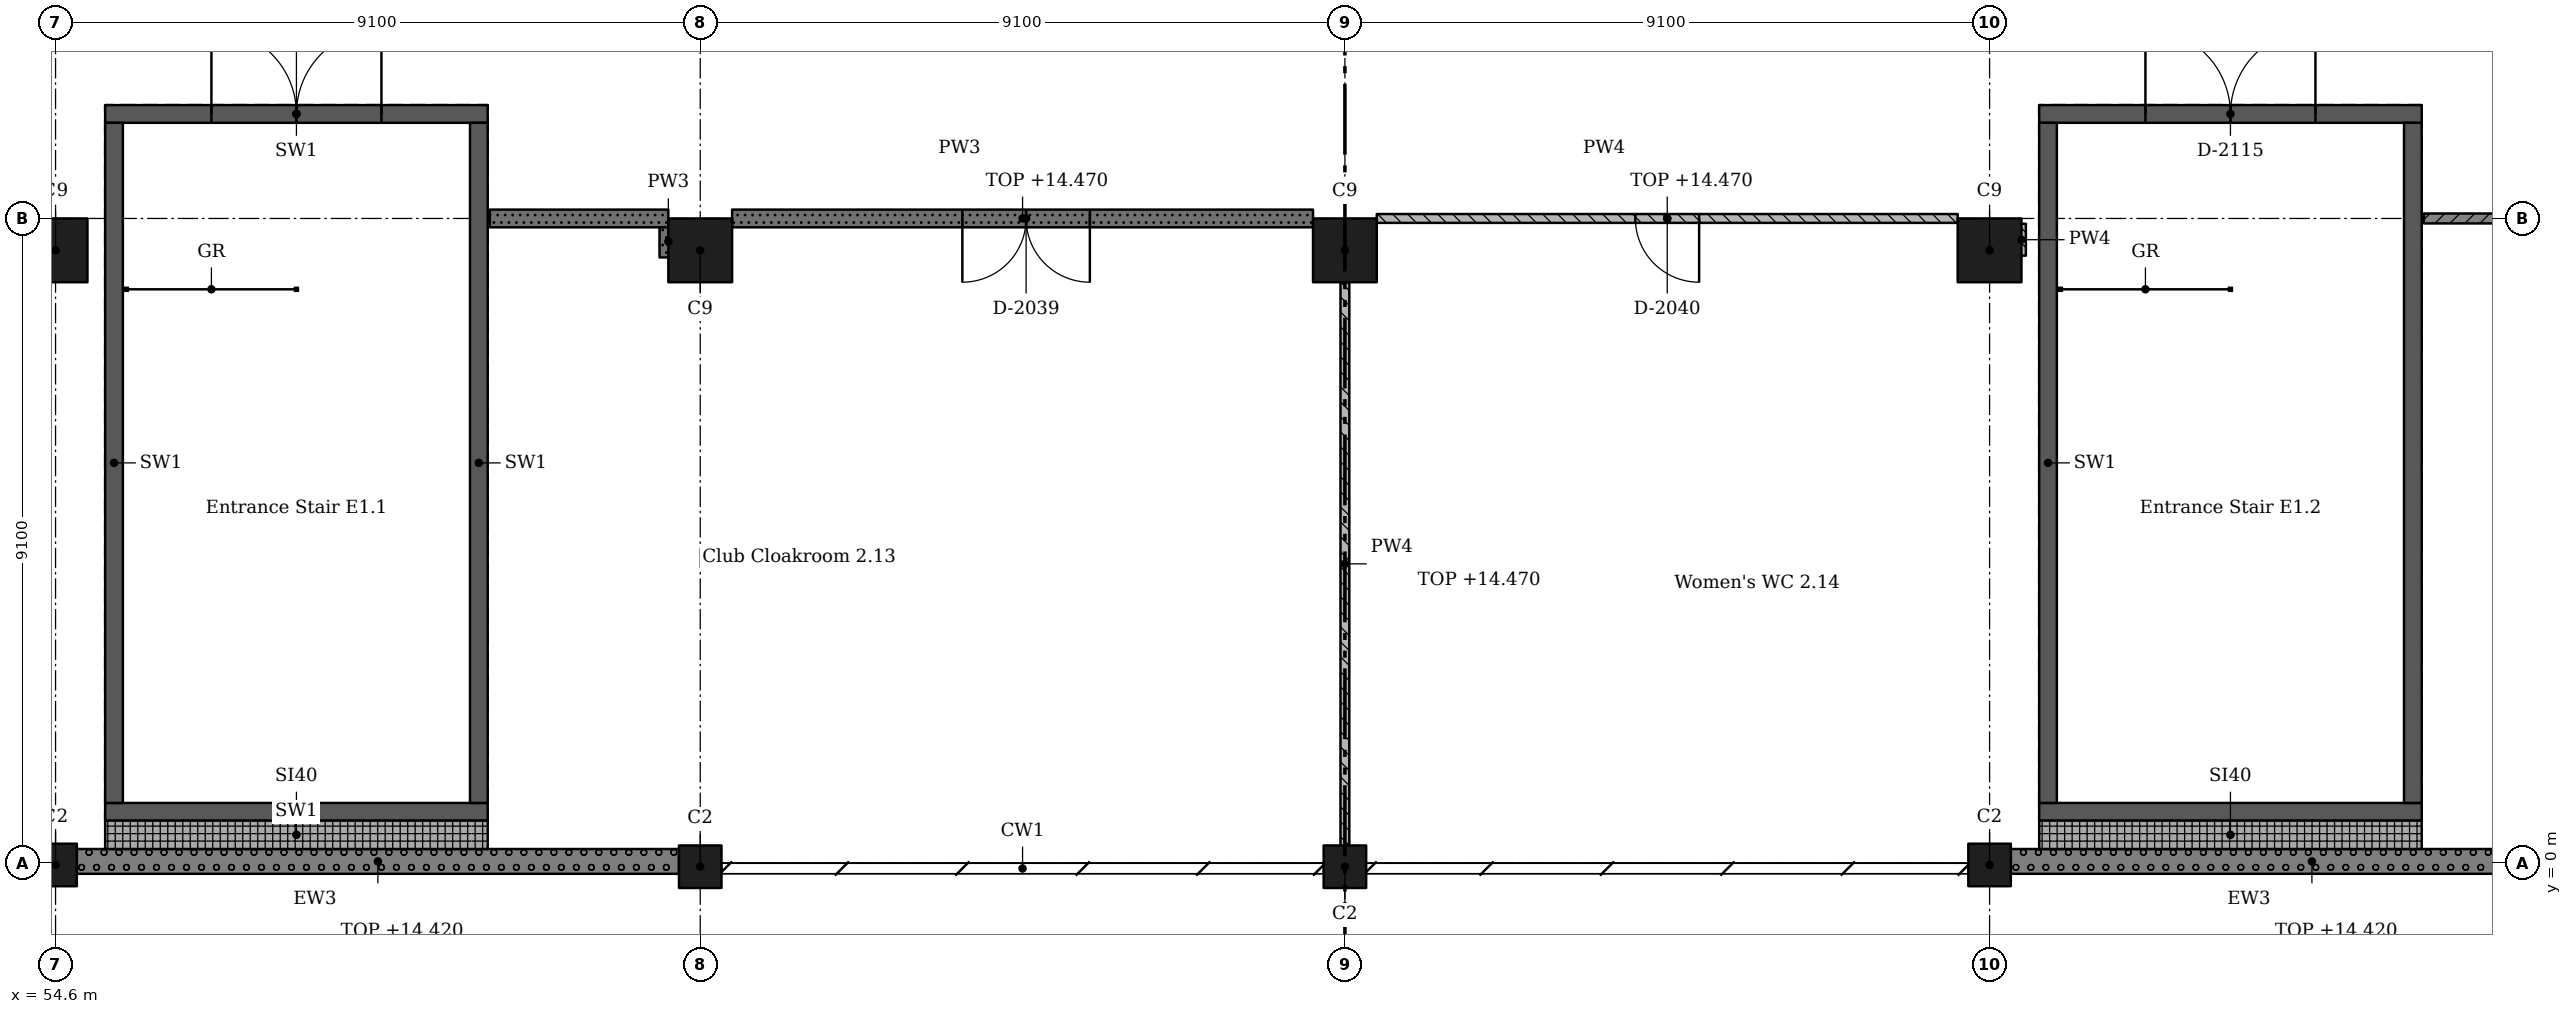
"""IFC4 building model, lengths in metres.
Left out: names, types, materials, properties, quantities, classifications, styles, units other than length and angle.
Written with IfcOpenShell. Run it as: python <this file> out.ifc"""

import sys

from ifc_helpers import new_model, si_unit, direction, frame, frame_2d, origin, origin_2d, place, context, subcontext, project, spatial, rectangle, extrude, element, fill, save


model = new_model("IFC4")
c1 = context("Model", 3, precision=1e-05, world=origin(), true_north=direction((0.0, 1.0)))
c2 = subcontext(c1, "Body", "Model", "MODEL_VIEW")
j1 = project(units=[si_unit("LENGTHUNIT", "METRE"), si_unit("PLANEANGLEUNIT", "RADIAN")], contexts=[c1])
p1 = place(None, origin())
s1 = spatial("IfcSite", under=j1, at=p1, CompositionType="ELEMENT")
p2 = place(p1, origin())
s2 = spatial("IfcBuilding", under=s1, at=p2, CompositionType="ELEMENT")
p3 = place(p2, frame((0.0, 0.0, 10.92)))
s3 = spatial("IfcBuildingStorey", under=s2, at=p3, CompositionType="ELEMENT", Elevation=10.92)
p4 = place(p3, frame((54.6, -0.025, 0.0), z_axis=(0.0, 0.0, 1.0), x_axis=(1.0, 0.0, 0.0)))
e1 = element("IfcColumn", 1, at=p4, inside=s3, PredefinedType="COLUMN", context=c2, shape_type="SweptSolid", body=[
    extrude(rectangle(XDim=0.6, YDim=0.6, at=origin_2d()), origin(), (0.0, 0.0, 1.0), 4.55),
])
p5 = place(p3, frame((54.6, 8.65, 0.0), z_axis=(0.0, 0.0, 1.0), x_axis=(1.0, 0.0, 0.0)))
e2 = element("IfcColumn", 2, at=p5, inside=s3, PredefinedType="COLUMN", context=c2, shape_type="SweptSolid", body=[
    extrude(rectangle(XDim=0.9, YDim=0.9, at=origin_2d()), origin(), (0.0, 0.0, 1.0), 4.55),
])
p6 = place(p3, frame((63.7, -0.05, 0.0), z_axis=(0.0, 0.0, 1.0), x_axis=(1.0, 0.0, 0.0)))
e3 = element("IfcColumn", 3, at=p6, inside=s3, PredefinedType="COLUMN", context=c2, shape_type="SweptSolid", body=[
    extrude(rectangle(XDim=0.6, YDim=0.6, at=origin_2d()), origin(), (0.0, 0.0, 1.0), 4.55),
])
p7 = place(p3, frame((63.7, 8.65, 0.0), z_axis=(0.0, 0.0, 1.0), x_axis=(1.0, 0.0, 0.0)))
e4 = element("IfcColumn", 4, at=p7, inside=s3, PredefinedType="COLUMN", context=c2, shape_type="SweptSolid", body=[
    extrude(rectangle(XDim=0.9, YDim=0.9, at=origin_2d()), origin(), (0.0, 0.0, 1.0), 4.55),
])
p8 = place(p3, frame((72.8, -0.05, 0.0), z_axis=(0.0, 0.0, 1.0), x_axis=(1.0, 0.0, 0.0)))
e5 = element("IfcColumn", 5, at=p8, inside=s3, PredefinedType="COLUMN", context=c2, shape_type="SweptSolid", body=[
    extrude(rectangle(XDim=0.6, YDim=0.6, at=origin_2d()), origin(), (0.0, 0.0, 1.0), 4.55),
])
p9 = place(p3, frame((72.8, 8.65, 0.0), z_axis=(0.0, 0.0, 1.0), x_axis=(1.0, 0.0, 0.0)))
e6 = element("IfcColumn", 6, at=p9, inside=s3, PredefinedType="COLUMN", context=c2, shape_type="SweptSolid", body=[
    extrude(rectangle(XDim=0.9, YDim=0.9, at=origin_2d()), origin(), (0.0, 0.0, 1.0), 4.55),
])
p10 = place(p3, frame((81.9, -0.025, 0.0), z_axis=(0.0, 0.0, 1.0), x_axis=(1.0, 0.0, 0.0)))
e7 = element("IfcColumn", 7, at=p10, inside=s3, PredefinedType="COLUMN", context=c2, shape_type="SweptSolid", body=[
    extrude(rectangle(XDim=0.6, YDim=0.6, at=origin_2d()), origin(), (0.0, 0.0, 1.0), 4.55),
])
p11 = place(p3, frame((81.9, 8.65, 0.0), z_axis=(0.0, 0.0, 1.0), x_axis=(1.0, 0.0, 0.0)))
e8 = element("IfcColumn", 8, at=p11, inside=s3, PredefinedType="COLUMN", context=c2, shape_type="SweptSolid", body=[
    extrude(rectangle(XDim=0.9, YDim=0.9, at=origin_2d()), origin(), (0.0, 0.0, 1.0), 4.55),
])
p12 = place(p3, frame((60.7, 0.725, 0.0), z_axis=(0.0, 0.0, 1.0), x_axis=(-1.0, 0.0, 0.0)))
e9 = element("IfcWall", 9, at=p12, inside=s3, PredefinedType="SHEAR", context=c2, shape_type="SweptSolid", body=[
    extrude(rectangle(XDim=5.4, YDim=0.25, at=frame_2d((2.7, 0.0))), origin(), (0.0, 0.0, 1.0), 4.55),
])
p13 = place(p3, frame((60.7, 10.575, 0.0), z_axis=(0.0, 0.0, 1.0), x_axis=(-1.0, 0.0, 0.0)))
e10 = element("IfcWall", 10, at=p13, inside=s3, PredefinedType="SHEAR", context=c2, shape_type="SweptSolid", body=[
    extrude(rectangle(XDim=5.4, YDim=0.25, at=frame_2d((2.7, 0.0))), origin(), (0.0, 0.0, 1.0), 4.55),
])
p14 = place(p13, frame((1.5, 0.0, 0.0)))
e11 = element("IfcOpeningElement", 11, at=p14, cuts=e10, PredefinedType="OPENING", context=c2, shape_type="SweptSolid", body=[
    extrude(rectangle(XDim=2.4, YDim=2.1, at=frame_2d((1.2, 1.05))), frame((0.0, 0.135, 0.0), z_axis=(0.0, -1.0, 0.0), x_axis=(1.0, 0.0, 0.0)), (0.0, 0.0, 1.0), 0.27),
])
for number, where, z_axis, x_axis in (
    (12, (55.425, 10.45, 0.0), (0.0, 0.0, 1.0), (0.0, -1.0, 0.0)),
    (13, (60.575, 10.45, 0.0), (0.0, 0.0, 1.0), (0.0, -1.0, 0.0)),
):
    element("IfcWall", number, at=place(p3, frame(where, z_axis=z_axis, x_axis=x_axis)), inside=s3, PredefinedType="SHEAR", context=c2, shape_type="SweptSolid", body=[
        extrude(rectangle(XDim=9.6, YDim=0.25, at=frame_2d((4.8, 0.0))), origin(), (0.0, 0.0, 1.0), 4.55),
    ])
p15 = place(p3, frame((88.0, 0.725, 0.0), z_axis=(0.0, 0.0, 1.0), x_axis=(-1.0, 0.0, 0.0)))
e14 = element("IfcWall", 14, at=p15, inside=s3, PredefinedType="SHEAR", context=c2, shape_type="SweptSolid", body=[
    extrude(rectangle(XDim=5.4, YDim=0.25, at=frame_2d((2.7, 0.0))), origin(), (0.0, 0.0, 1.0), 4.55),
])
p16 = place(p3, frame((88.0, 10.575, 0.0), z_axis=(0.0, 0.0, 1.0), x_axis=(-1.0, 0.0, 0.0)))
e15 = element("IfcWall", 15, at=p16, inside=s3, PredefinedType="SHEAR", context=c2, shape_type="SweptSolid", body=[
    extrude(rectangle(XDim=5.4, YDim=0.25, at=frame_2d((2.7, 0.0))), origin(), (0.0, 0.0, 1.0), 4.55),
])
p17 = place(p16, frame((1.5, 0.0, 0.0)))
e16 = element("IfcOpeningElement", 16, at=p17, cuts=e15, PredefinedType="OPENING", context=c2, shape_type="SweptSolid", body=[
    extrude(rectangle(XDim=2.4, YDim=2.1, at=frame_2d((1.2, 1.05))), frame((0.0, 0.135, 0.0), z_axis=(0.0, -1.0, 0.0), x_axis=(1.0, 0.0, 0.0)), (0.0, 0.0, 1.0), 0.27),
])
for number, where, z_axis, x_axis in (
    (17, (82.725, 10.45, 0.0), (0.0, 0.0, 1.0), (0.0, -1.0, 0.0)),
    (18, (87.875, 10.45, 0.0), (0.0, 0.0, 1.0), (0.0, -1.0, 0.0)),
):
    element("IfcWall", number, at=place(p3, frame(where, z_axis=z_axis, x_axis=x_axis)), inside=s3, PredefinedType="SHEAR", context=c2, shape_type="SweptSolid", body=[
        extrude(rectangle(XDim=9.6, YDim=0.25, at=frame_2d((4.8, 0.0))), origin(), (0.0, 0.0, 1.0), 4.55),
    ])
for number, where, z_axis, x_axis in (
    (19, (54.9, 0.025, 0.0), (0.0, 0.0, 1.0), (1.0, 0.0, 0.0)),
    (20, (82.2, 0.025, 0.0), (0.0, 0.0, 1.0), (1.0, 0.0, 0.0)),
):
    element("IfcWall", number, at=place(p3, frame(where, z_axis=z_axis, x_axis=x_axis)), inside=s3, PredefinedType="SOLIDWALL", context=c2, shape_type="SweptSolid", body=[
        extrude(rectangle(XDim=8.5, YDim=0.35, at=frame_2d((4.25, 0.0))), origin(), (0.0, 0.0, 1.0), 3.5),
    ])
for number, where, z_axis, x_axis in (
    (21, (55.3, 0.4, 0.0), (0.0, 0.0, 1.0), (1.0, 0.0, 0.0)),
    (22, (82.6, 0.4, 0.0), (0.0, 0.0, 1.0), (1.0, 0.0, 0.0)),
):
    element("IfcWall", number, at=place(p3, frame(where, z_axis=z_axis, x_axis=x_axis)), inside=s3, PredefinedType="SOLIDWALL", context=c2, shape_type="SweptSolid", body=[
        extrude(rectangle(XDim=5.4, YDim=0.4, at=frame_2d((2.7, 0.0))), origin(), (0.0, 0.0, 1.0), 4.25),
    ])
p18 = place(p3, frame((63.25, 8.55, 0.0), z_axis=(0.0, 0.0, 1.0), x_axis=(0.0, 1.0, 0.0)))
e23 = element("IfcWall", 23, at=p18, inside=s3, PredefinedType="SOLIDWALL", context=c2, shape_type="SweptSolid", body=[
    extrude(rectangle(XDim=0.45, YDim=0.25, at=frame_2d((0.225, 0.0))), origin(), (0.0, 0.0, 1.0), 4.25),
])
p19 = place(p3, frame((63.25, 9.1, 0.0), z_axis=(0.0, 0.0, 1.0), x_axis=(-1.0, 0.0, 0.0)))
e24 = element("IfcWall", 24, at=p19, inside=s3, PredefinedType="SOLIDWALL", context=c2, shape_type="SweptSolid", body=[
    extrude(rectangle(XDim=2.52, YDim=0.25, at=frame_2d((1.26, 0.0))), origin(), (0.0, 0.0, 1.0), 3.55),
])
p20 = place(p3, frame((72.35, 9.1, 0.0), z_axis=(0.0, 0.0, 1.0), x_axis=(-1.0, 0.0, 0.0)))
e25 = element("IfcWall", 25, at=p20, inside=s3, PredefinedType="SOLIDWALL", context=c2, shape_type="SweptSolid", body=[
    extrude(rectangle(XDim=8.2, YDim=0.25, at=frame_2d((4.1, 0.0))), origin(), (0.0, 0.0, 1.0), 3.55),
])
p21 = place(p20, frame((3.15, 0.0, 0.0)))
e26 = element("IfcOpeningElement", 26, at=p21, cuts=e25, PredefinedType="OPENING", context=c2, shape_type="SweptSolid", body=[
    extrude(rectangle(XDim=1.8, YDim=2.1, at=frame_2d((0.9, 1.05))), frame((0.0, 0.135, 0.0), z_axis=(0.0, -1.0, 0.0), x_axis=(1.0, 0.0, 0.0)), (0.0, 0.0, 1.0), 0.27),
])
p22 = place(p3, frame((72.8, 8.2, 0.0), z_axis=(0.0, 0.0, 1.0), x_axis=(0.0, -1.0, 0.0)))
e27 = element("IfcWall", 27, at=p22, inside=s3, PredefinedType="PARTITIONING", context=c2, shape_type="SweptSolid", body=[
    extrude(rectangle(XDim=7.95, YDim=0.125, at=frame_2d((3.975, 0.0))), origin(), (0.0, 0.0, 1.0), 3.55),
])
p23 = place(p3, frame((81.45, 9.1, 0.0), z_axis=(0.0, 0.0, 1.0), x_axis=(-1.0, 0.0, 0.0)))
e28 = element("IfcWall", 28, at=p23, inside=s3, PredefinedType="PARTITIONING", context=c2, shape_type="SweptSolid", body=[
    extrude(rectangle(XDim=8.2, YDim=0.125, at=frame_2d((4.1, 0.0))), origin(), (0.0, 0.0, 1.0), 3.55),
])
p24 = place(p23, frame((3.65, 0.0, 0.0)))
e29 = element("IfcOpeningElement", 29, at=p24, cuts=e28, PredefinedType="OPENING", context=c2, shape_type="SweptSolid", body=[
    extrude(rectangle(XDim=0.9, YDim=2.1, at=frame_2d((0.45, 1.05))), frame((0.0, 0.073, 0.0), z_axis=(0.0, -1.0, 0.0), x_axis=(1.0, 0.0, 0.0)), (0.0, 0.0, 1.0), 0.145),
])
p25 = place(p3, frame((82.35, 9.025, 0.0), z_axis=(0.0, 0.0, 1.0), x_axis=(0.0, -1.0, 0.0)))
e30 = element("IfcWall", 30, at=p25, inside=s3, PredefinedType="PARTITIONING", context=c2, shape_type="SweptSolid", body=[
    extrude(rectangle(XDim=0.45, YDim=0.125, at=frame_2d((0.225, 0.0))), origin(), (0.0, 0.0, 1.0), 4.25),
])
p26 = place(p3, frame((90.55, 9.1, 0.0), z_axis=(0.0, 0.0, 1.0), x_axis=(-1.0, 0.0, 0.0)))
e31 = element("IfcWall", 31, at=p26, inside=s3, PredefinedType="SOLIDWALL", context=c2, shape_type="SweptSolid", body=[
    extrude(rectangle(XDim=2.52, YDim=0.14, at=frame_2d((1.26, 0.0))), origin(), (0.0, 0.0, 1.0), 3.55),
])
p27 = place(p21, origin())
e32 = element("IfcDoor", 32, at=p27, inside=s3, OperationType="DOUBLE_DOOR_SINGLE_SWING", PredefinedType="DOOR", context=c2, shape_type="SweptSolid", body=[
    extrude(rectangle(XDim=1.8, YDim=2.1, at=frame_2d((0.9, 1.05))), frame((0.0, 0.025, 0.0), z_axis=(0.0, -1.0, 0.0), x_axis=(1.0, 0.0, 0.0)), (0.0, 0.0, 1.0), 0.05),
])
fill(e26, e32)
p28 = place(p24, origin())
e33 = element("IfcDoor", 33, at=p28, inside=s3, OperationType="SINGLE_SWING_RIGHT", PredefinedType="DOOR", context=c2, shape_type="SweptSolid", body=[
    extrude(rectangle(XDim=0.9, YDim=2.1, at=frame_2d((0.45, 1.05))), frame((0.0, 0.025, 0.0), z_axis=(0.0, -1.0, 0.0), x_axis=(1.0, 0.0, 0.0)), (0.0, 0.0, 1.0), 0.05),
])
fill(e29, e33)
p29 = place(p14, origin())
e34 = element("IfcDoor", 34, at=p29, inside=s3, OperationType="DOUBLE_DOOR_SINGLE_SWING", PredefinedType="DOOR", context=c2, shape_type="SweptSolid", body=[
    extrude(rectangle(XDim=2.4, YDim=2.1, at=frame_2d((1.2, 1.05))), frame((0.0, 0.025, 0.0), z_axis=(0.0, -1.0, 0.0), x_axis=(1.0, 0.0, 0.0)), (0.0, 0.0, 1.0), 0.05),
])
fill(e11, e34)
p30 = place(p17, origin())
e35 = element("IfcDoor", 35, at=p30, inside=s3, OperationType="DOUBLE_DOOR_SINGLE_SWING", PredefinedType="DOOR", context=c2, shape_type="SweptSolid", body=[
    extrude(rectangle(XDim=2.4, YDim=2.1, at=frame_2d((1.2, 1.05))), frame((0.0, 0.025, 0.0), z_axis=(0.0, -1.0, 0.0), x_axis=(1.0, 0.0, 0.0)), (0.0, 0.0, 1.0), 0.05),
])
fill(e16, e35)
save(model, sys.argv[1])
